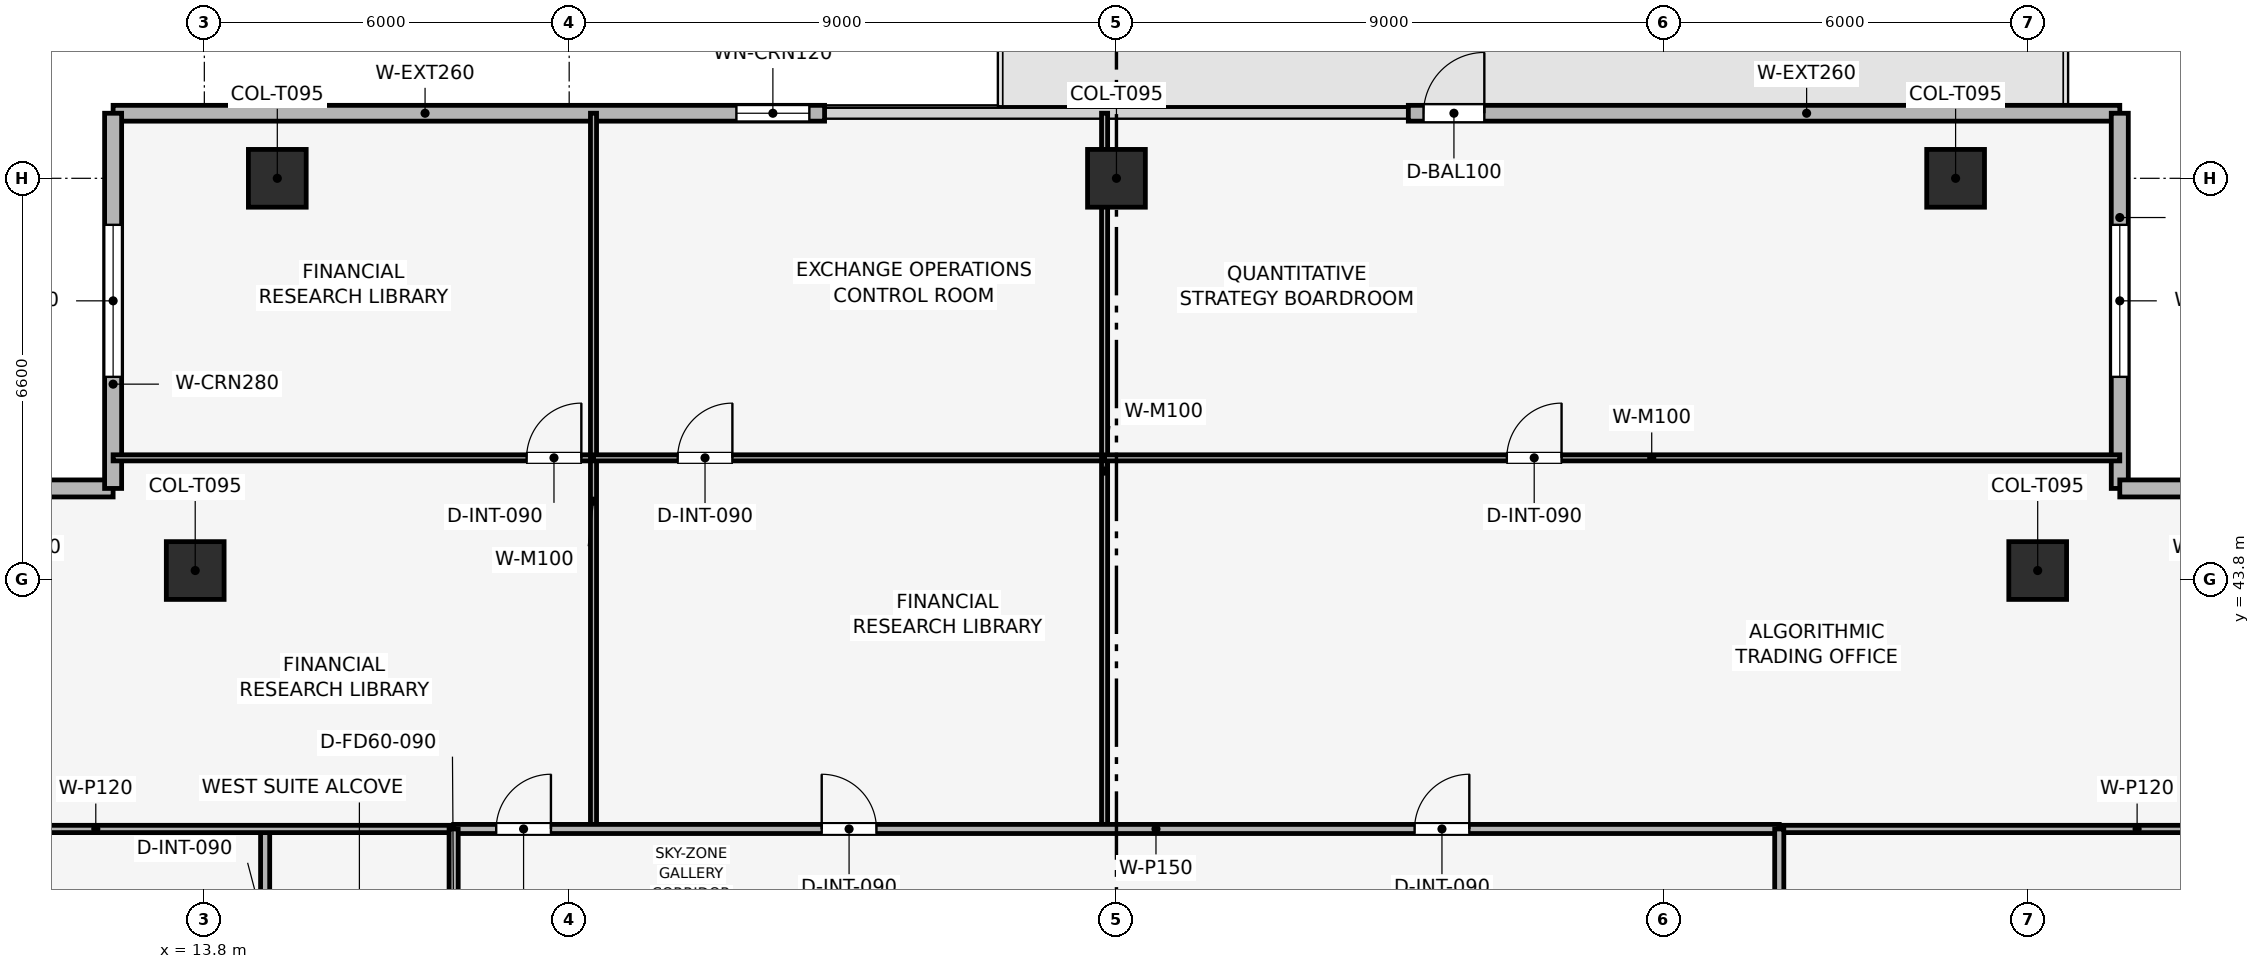
"""IFC4 building model, lengths in metres.
Left out: names, types, materials, properties, quantities, classifications, styles, units other than length and angle.
Written with IfcOpenShell. Run it as: python <this file> out.ifc"""

import sys

from ifc_helpers import new_model, si_unit, direction, frame, frame_2d, origin, origin_2d, place, context, subcontext, project, spatial, rectangle, extrude, element, fill, save


model = new_model("IFC4")
c1 = context("Model", 3, precision=1e-05, world=origin(), true_north=direction((0.0, 1.0)))
c2 = subcontext(c1, "Body", "Model", "MODEL_VIEW")
j1 = project(units=[si_unit("LENGTHUNIT", "METRE"), si_unit("PLANEANGLEUNIT", "RADIAN")], contexts=[c1])
p1 = place(None, origin())
s1 = spatial("IfcSite", under=j1, at=p1, CompositionType="ELEMENT")
p2 = place(p1, origin())
s2 = spatial("IfcBuilding", under=s1, at=p2, CompositionType="ELEMENT")
p3 = place(p2, frame((0.0, 0.0, 314.25)))
s3 = spatial("IfcBuildingStorey", under=s2, at=p3, CompositionType="ELEMENT", Elevation=314.25)
for number, where, z_axis, x_axis in (
    (1, (42.6, 50.4, 0.003), (0.0, 0.0, 1.0), (1.0, 0.0, 0.0)),
    (2, (28.8, 50.4, 0.003), (0.0, 0.0, 1.0), (1.0, 0.0, 0.0)),
    (3, (15.0, 50.4, 0.003), (0.0, 0.0, 1.0), (1.0, 0.0, 0.0)),
    (4, (43.95, 43.95, 0.003), (0.0, 0.0, 1.0), (1.0, 0.0, 0.0)),
    (5, (13.65, 43.95, 0.003), (0.0, 0.0, 1.0), (1.0, 0.0, 0.0)),
):
    element("IfcColumn", number, at=place(p3, frame(where, z_axis=z_axis, x_axis=x_axis)), inside=s3, PredefinedType="COLUMN", context=c2, shape_type="SweptSolid", body=[
        extrude(rectangle(XDim=0.95, YDim=0.95, at=origin_2d()), origin(), (0.0, 0.0, 1.0), 3.504),
    ])
p4 = place(p3, frame((12.3, 51.47, 0.0), z_axis=(0.0, 0.0, 1.0), x_axis=(1.0, 0.0, 0.0)))
e6 = element("IfcWall", 6, at=p4, inside=s3, PredefinedType="SOLIDWALL", context=c2, shape_type="SweptSolid", body=[
    extrude(rectangle(XDim=11.7, YDim=0.26, at=frame_2d((5.85, 0.0))), origin(), (0.0, 0.0, 1.0), 3.51),
])
p5 = place(p4, frame((10.25, 0.0, 0.9)))
e7 = element("IfcOpeningElement", 7, at=p5, cuts=e6, PredefinedType="OPENING", context=c2, shape_type="SweptSolid", body=[
    extrude(rectangle(XDim=1.2, YDim=2.1, at=frame_2d((0.6, 1.05))), frame((0.0, 0.14, 0.0), z_axis=(0.0, -1.0, 0.0), x_axis=(1.0, 0.0, 0.0)), (0.0, 0.0, 1.0), 0.28),
])
p6 = place(p3, frame((33.6, 51.47, 0.0), z_axis=(0.0, 0.0, 1.0), x_axis=(1.0, 0.0, 0.0)))
e8 = element("IfcWall", 8, at=p6, inside=s3, PredefinedType="SOLIDWALL", context=c2, shape_type="SweptSolid", body=[
    extrude(rectangle(XDim=11.7, YDim=0.26, at=frame_2d((5.85, 0.0))), origin(), (0.0, 0.0, 1.0), 3.51),
])
p7 = place(p6, frame((0.25, 0.0, 0.0)))
e9 = element("IfcOpeningElement", 9, at=p7, cuts=e8, PredefinedType="OPENING", context=c2, shape_type="SweptSolid", body=[
    extrude(rectangle(XDim=1.0, YDim=2.2, at=frame_2d((0.5, 1.1))), frame((0.0, 0.14, 0.0), z_axis=(0.0, -1.0, 0.0), x_axis=(1.0, 0.0, 0.0)), (0.0, 0.0, 1.0), 0.28),
])
p8 = place(p3, frame((6.13, 45.3, 0.0), z_axis=(0.0, 0.0, 1.0), x_axis=(1.0, 0.0, 0.0)))
e10 = element("IfcWall", 10, at=p8, inside=s3, PredefinedType="SOLIDWALL", context=c2, shape_type="SweptSolid", body=[
    extrude(rectangle(XDim=6.17, YDim=0.28, at=frame_2d((3.085, 0.0))), origin(), (0.0, 0.0, 1.0), 3.51),
])
p9 = place(p8, frame((1.835, 0.0, 0.9)))
e11 = element("IfcOpeningElement", 11, at=p9, cuts=e10, PredefinedType="OPENING", context=c2, shape_type="SweptSolid", body=[
    extrude(rectangle(XDim=2.5, YDim=1.9, at=frame_2d((1.25, 0.95))), frame((0.0, 0.15, 0.0), z_axis=(0.0, -1.0, 0.0), x_axis=(1.0, 0.0, 0.0)), (0.0, 0.0, 1.0), 0.3),
])
p10 = place(p3, frame((12.3, 45.3, 0.0), z_axis=(0.0, 0.0, 1.0), x_axis=(0.0, 1.0, 0.0)))
e12 = element("IfcWall", 12, at=p10, inside=s3, PredefinedType="SOLIDWALL", context=c2, shape_type="SweptSolid", body=[
    extrude(rectangle(XDim=6.17, YDim=0.28, at=frame_2d((3.085, 0.0))), origin(), (0.0, 0.0, 1.0), 3.51),
])
p11 = place(p10, frame((1.835, 0.0, 0.9)))
e13 = element("IfcOpeningElement", 13, at=p11, cuts=e12, PredefinedType="OPENING", context=c2, shape_type="SweptSolid", body=[
    extrude(rectangle(XDim=2.5, YDim=1.9, at=frame_2d((1.25, 0.95))), frame((0.0, 0.15, 0.0), z_axis=(0.0, -1.0, 0.0), x_axis=(1.0, 0.0, 0.0)), (0.0, 0.0, 1.0), 0.3),
])
p12 = place(p3, frame((45.3, 51.47, 0.0), z_axis=(0.0, 0.0, 1.0), x_axis=(0.0, -1.0, 0.0)))
e14 = element("IfcWall", 14, at=p12, inside=s3, PredefinedType="SOLIDWALL", context=c2, shape_type="SweptSolid", body=[
    extrude(rectangle(XDim=6.17, YDim=0.28, at=frame_2d((3.085, 0.0))), origin(), (0.0, 0.0, 1.0), 3.51),
])
p13 = place(p12, frame((1.835, 0.0, 0.9)))
e15 = element("IfcOpeningElement", 15, at=p13, cuts=e14, PredefinedType="OPENING", context=c2, shape_type="SweptSolid", body=[
    extrude(rectangle(XDim=2.5, YDim=1.9, at=frame_2d((1.25, 0.95))), frame((0.0, 0.15, 0.0), z_axis=(0.0, -1.0, 0.0), x_axis=(1.0, 0.0, 0.0)), (0.0, 0.0, 1.0), 0.3),
])
p14 = place(p3, frame((45.3, 45.3, 0.0), z_axis=(0.0, 0.0, 1.0), x_axis=(1.0, 0.0, 0.0)))
e16 = element("IfcWall", 16, at=p14, inside=s3, PredefinedType="SOLIDWALL", context=c2, shape_type="SweptSolid", body=[
    extrude(rectangle(XDim=6.17, YDim=0.28, at=frame_2d((3.085, 0.0))), origin(), (0.0, 0.0, 1.0), 3.51),
])
p15 = place(p14, frame((1.835, 0.0, 0.9)))
e17 = element("IfcOpeningElement", 17, at=p15, cuts=e16, PredefinedType="OPENING", context=c2, shape_type="SweptSolid", body=[
    extrude(rectangle(XDim=2.5, YDim=1.9, at=frame_2d((1.25, 0.95))), frame((0.0, 0.15, 0.0), z_axis=(0.0, -1.0, 0.0), x_axis=(1.0, 0.0, 0.0)), (0.0, 0.0, 1.0), 0.3),
])
p16 = place(p3, frame((12.3, 45.803, 0.0), z_axis=(0.0, 0.0, 1.0), x_axis=(1.0, 0.0, 0.0)))
e18 = element("IfcWall", 18, at=p16, inside=s3, PredefinedType="MOVABLE", context=c2, shape_type="SweptSolid", body=[
    extrude(rectangle(XDim=7.9, YDim=0.1, at=frame_2d((3.95, 0.0))), origin(), (0.0, 0.0, 1.0), 3.095),
])
p17 = place(p16, frame((6.8, 0.0, 0.0)))
e19 = element("IfcOpeningElement", 19, at=p17, cuts=e18, PredefinedType="OPENING", context=c2, shape_type="SweptSolid", body=[
    extrude(rectangle(XDim=0.9, YDim=2.1, at=frame_2d((0.45, 1.05))), frame((0.0, 0.06, 0.0), z_axis=(0.0, -1.0, 0.0), x_axis=(1.0, 0.0, 0.0)), (0.0, 0.0, 1.0), 0.12),
])
p18 = place(p3, frame((20.2, 39.7, 0.0), z_axis=(0.0, 0.0, 1.0), x_axis=(0.0, 1.0, 0.0)))
e20 = element("IfcWall", 20, at=p18, inside=s3, PredefinedType="MOVABLE", context=c2, shape_type="SweptSolid", body=[
    extrude(rectangle(XDim=11.77, YDim=0.1, at=frame_2d((5.885, 0.0))), origin(), (0.0, 0.0, 1.0), 3.095),
])
p19 = place(p3, frame((20.2, 45.803, 0.0), z_axis=(0.0, 0.0, 1.0), x_axis=(1.0, 0.0, 0.0)))
e21 = element("IfcWall", 21, at=p19, inside=s3, PredefinedType="MOVABLE", context=c2, shape_type="SweptSolid", body=[
    extrude(rectangle(XDim=8.405, YDim=0.1, at=frame_2d((4.203, 0.0))), origin(), (0.0, 0.0, 1.0), 3.095),
])
p20 = place(p19, frame((1.384, 0.0, 0.0)))
e22 = element("IfcOpeningElement", 22, at=p20, cuts=e21, PredefinedType="OPENING", context=c2, shape_type="SweptSolid", body=[
    extrude(rectangle(XDim=0.9, YDim=2.1, at=frame_2d((0.45, 1.05))), frame((0.0, 0.06, 0.0), z_axis=(0.0, -1.0, 0.0), x_axis=(1.0, 0.0, 0.0)), (0.0, 0.0, 1.0), 0.12),
])
p21 = place(p3, frame((28.605, 39.7, 0.0), z_axis=(0.0, 0.0, 1.0), x_axis=(0.0, 1.0, 0.0)))
e23 = element("IfcWall", 23, at=p21, inside=s3, PredefinedType="MOVABLE", context=c2, shape_type="SweptSolid", body=[
    extrude(rectangle(XDim=11.77, YDim=0.1, at=frame_2d((5.885, 0.0))), origin(), (0.0, 0.0, 1.0), 2.995),
])
p22 = place(p3, frame((28.605, 45.803, 0.0), z_axis=(0.0, 0.0, 1.0), x_axis=(1.0, 0.0, 0.0)))
e24 = element("IfcWall", 24, at=p22, inside=s3, PredefinedType="MOVABLE", context=c2, shape_type="SweptSolid", body=[
    extrude(rectangle(XDim=16.695, YDim=0.1, at=frame_2d((8.348, 0.0))), origin(), (0.0, 0.0, 1.0), 3.095),
])
p23 = place(p22, frame((6.615, 0.0, 0.0)))
e25 = element("IfcOpeningElement", 25, at=p23, cuts=e24, PredefinedType="OPENING", context=c2, shape_type="SweptSolid", body=[
    extrude(rectangle(XDim=0.9, YDim=2.1, at=frame_2d((0.45, 1.05))), frame((0.0, 0.06, 0.0), z_axis=(0.0, -1.0, 0.0), x_axis=(1.0, 0.0, 0.0)), (0.0, 0.0, 1.0), 0.12),
])
p24 = place(p3, frame((14.8, 28.0, 0.0), z_axis=(0.0, 0.0, 1.0), x_axis=(0.0, 1.0, 0.0)))
e26 = element("IfcWall", 26, at=p24, inside=s3, PredefinedType="PARTITIONING", context=c2, shape_type="SweptSolid", body=[
    extrude(rectangle(XDim=11.7, YDim=0.15, at=frame_2d((5.85, 0.0))), origin(), (0.0, 0.0, 1.0), 3.095),
])
p25 = place(p24, frame((9.6, 0.0, 0.0)))
e27 = element("IfcOpeningElement", 27, at=p25, cuts=e26, PredefinedType="OPENING", context=c2, shape_type="SweptSolid", body=[
    extrude(rectangle(XDim=0.9, YDim=2.1, at=frame_2d((0.45, 1.05))), frame((0.0, 0.085, 0.0), z_axis=(0.0, -1.0, 0.0), x_axis=(1.0, 0.0, 0.0)), (0.0, 0.0, 1.0), 0.17),
])
for number, where, z_axis, x_axis in (
    (28, (6.13, 39.7, 0.0), (0.0, 0.0, 1.0), (1.0, 0.0, 0.0)),
    (29, (39.7, 39.7, 0.0), (0.0, 0.0, 1.0), (1.0, 0.0, 0.0)),
):
    element("IfcWall", number, at=place(p3, frame(where, z_axis=z_axis, x_axis=x_axis)), inside=s3, PredefinedType="PARTITIONING", context=c2, shape_type="SweptSolid", body=[
        extrude(rectangle(XDim=11.77, YDim=0.12, at=frame_2d((5.885, 0.0))), origin(), (0.0, 0.0, 1.0), 3.095),
    ])
p26 = place(p3, frame((17.9, 39.7, 0.0), z_axis=(0.0, 0.0, 1.0), x_axis=(1.0, 0.0, 0.0)))
e30 = element("IfcWall", 30, at=p26, inside=s3, PredefinedType="PARTITIONING", context=c2, shape_type="SweptSolid", body=[
    extrude(rectangle(XDim=21.8, YDim=0.15, at=frame_2d((10.9, 0.0))), origin(), (0.0, 0.0, 1.0), 3.095),
])
p27 = place(p26, frame((0.7, 0.0, 0.0)))
e31 = element("IfcOpeningElement", 31, at=p27, cuts=e30, PredefinedType="OPENING", context=c2, shape_type="SweptSolid", body=[
    extrude(rectangle(XDim=0.9, YDim=2.1, at=frame_2d((0.45, 1.05))), frame((0.0, 0.085, 0.0), z_axis=(0.0, -1.0, 0.0), x_axis=(1.0, 0.0, 0.0)), (0.0, 0.0, 1.0), 0.17),
])
p28 = place(p26, frame((6.053, 0.0, 0.0)))
e32 = element("IfcOpeningElement", 32, at=p28, cuts=e30, PredefinedType="OPENING", context=c2, shape_type="SweptSolid", body=[
    extrude(rectangle(XDim=0.9, YDim=2.1, at=frame_2d((0.45, 1.05))), frame((0.0, 0.085, 0.0), z_axis=(0.0, -1.0, 0.0), x_axis=(1.0, 0.0, 0.0)), (0.0, 0.0, 1.0), 0.17),
])
p29 = place(p26, frame((15.803, 0.0, 0.0)))
e33 = element("IfcOpeningElement", 33, at=p29, cuts=e30, PredefinedType="OPENING", context=c2, shape_type="SweptSolid", body=[
    extrude(rectangle(XDim=0.9, YDim=2.1, at=frame_2d((0.45, 1.05))), frame((0.0, 0.085, 0.0), z_axis=(0.0, -1.0, 0.0), x_axis=(1.0, 0.0, 0.0)), (0.0, 0.0, 1.0), 0.17),
])
p30 = place(p3, frame((17.9, 12.3, 0.0), z_axis=(0.0, 0.0, 1.0), x_axis=(0.0, 1.0, 0.0)))
e34 = element("IfcWall", 34, at=p30, inside=s3, PredefinedType="PARTITIONING", context=c2, shape_type="SweptSolid", body=[
    extrude(rectangle(XDim=27.4, YDim=0.15, at=frame_2d((13.7, 0.0))), origin(), (0.0, 0.0, 1.0), 3.095),
])
p31 = place(p30, frame((2.365, 0.0, 0.0)))
e35 = element("IfcOpeningElement", 35, at=p31, cuts=e34, PredefinedType="OPENING", context=c2, shape_type="SweptSolid", body=[
    extrude(rectangle(XDim=0.9, YDim=2.1, at=frame_2d((0.45, 1.05))), frame((0.0, 0.085, 0.0), z_axis=(0.0, -1.0, 0.0), x_axis=(1.0, 0.0, 0.0)), (0.0, 0.0, 1.0), 0.17),
])
p32 = place(p30, frame((10.215, 0.0, 0.0)))
e36 = element("IfcOpeningElement", 36, at=p32, cuts=e34, PredefinedType="OPENING", context=c2, shape_type="SweptSolid", body=[
    extrude(rectangle(XDim=0.9, YDim=2.1, at=frame_2d((0.45, 1.05))), frame((0.0, 0.085, 0.0), z_axis=(0.0, -1.0, 0.0), x_axis=(1.0, 0.0, 0.0)), (0.0, 0.0, 1.0), 0.17),
])
p33 = place(p30, frame((16.65, 0.0, 0.0)))
e37 = element("IfcOpeningElement", 37, at=p33, cuts=e34, PredefinedType="OPENING", context=c2, shape_type="SweptSolid", body=[
    extrude(rectangle(XDim=0.9, YDim=2.1, at=frame_2d((0.45, 1.05))), frame((0.0, 0.085, 0.0), z_axis=(0.0, -1.0, 0.0), x_axis=(1.0, 0.0, 0.0)), (0.0, 0.0, 1.0), 0.17),
])
p34 = place(p30, frame((19.55, 0.0, 0.0)))
e38 = element("IfcOpeningElement", 38, at=p34, cuts=e34, PredefinedType="OPENING", context=c2, shape_type="SweptSolid", body=[
    extrude(rectangle(XDim=0.9, YDim=2.1, at=frame_2d((0.45, 1.05))), frame((0.0, 0.085, 0.0), z_axis=(0.0, -1.0, 0.0), x_axis=(1.0, 0.0, 0.0)), (0.0, 0.0, 1.0), 0.17),
])
p35 = place(p30, frame((22.3, 0.0, 0.0)))
e39 = element("IfcOpeningElement", 39, at=p35, cuts=e34, PredefinedType="OPENING", context=c2, shape_type="SweptSolid", body=[
    extrude(rectangle(XDim=0.95, YDim=2.1, at=frame_2d((0.475, 1.05))), frame((0.0, 0.085, 0.0), z_axis=(0.0, -1.0, 0.0), x_axis=(1.0, 0.0, 0.0)), (0.0, 0.0, 1.0), 0.17),
])
p36 = place(p30, frame((25.3, 0.0, 0.0)))
e40 = element("IfcOpeningElement", 40, at=p36, cuts=e34, PredefinedType="OPENING", context=c2, shape_type="SweptSolid", body=[
    extrude(rectangle(XDim=0.9, YDim=2.1, at=frame_2d((0.45, 1.05))), frame((0.0, 0.085, 0.0), z_axis=(0.0, -1.0, 0.0), x_axis=(1.0, 0.0, 0.0)), (0.0, 0.0, 1.0), 0.17),
])
p37 = place(p3, frame((39.7, 24.4, 0.0), z_axis=(0.0, 0.0, 1.0), x_axis=(0.0, 1.0, 0.0)))
e41 = element("IfcWall", 41, at=p37, inside=s3, PredefinedType="PARTITIONING", context=c2, shape_type="SweptSolid", body=[
    extrude(rectangle(XDim=15.3, YDim=0.15, at=frame_2d((7.65, 0.0))), origin(), (0.0, 0.0, 1.0), 3.095),
])
p38 = place(p37, frame((7.2, 0.0, 0.0)))
e42 = element("IfcOpeningElement", 42, at=p38, cuts=e41, PredefinedType="OPENING", context=c2, shape_type="SweptSolid", body=[
    extrude(rectangle(XDim=0.9, YDim=2.1, at=frame_2d((0.45, 1.05))), frame((0.0, 0.085, 0.0), z_axis=(0.0, -1.0, 0.0), x_axis=(1.0, 0.0, 0.0)), (0.0, 0.0, 1.0), 0.17),
])
p39 = place(p7, origin())
e43 = element("IfcDoor", 43, at=p39, inside=s3, OperationType="SINGLE_SWING_RIGHT", PredefinedType="DOOR", context=c2, shape_type="SweptSolid", body=[
    extrude(rectangle(XDim=1.0, YDim=2.2, at=frame_2d((0.5, 1.1))), frame((0.0, 0.025, 0.0), z_axis=(0.0, -1.0, 0.0), x_axis=(1.0, 0.0, 0.0)), (0.0, 0.0, 1.0), 0.05),
])
fill(e9, e43)
p40 = place(p5, origin())
e44 = element("IfcWindow", 44, at=p40, inside=s3, PartitioningType="SINGLE_PANEL", PredefinedType="WINDOW", context=c2, shape_type="SweptSolid", body=[
    extrude(rectangle(XDim=1.2, YDim=2.1, at=frame_2d((0.6, 1.05))), frame((0.0, 0.03, 0.0), z_axis=(0.0, -1.0, 0.0), x_axis=(1.0, 0.0, 0.0)), (0.0, 0.0, 1.0), 0.06),
])
fill(e7, e44)
p41 = place(p11, origin())
e45 = element("IfcWindow", 45, at=p41, inside=s3, PartitioningType="SINGLE_PANEL", PredefinedType="WINDOW", context=c2, shape_type="SweptSolid", body=[
    extrude(rectangle(XDim=2.5, YDim=1.9, at=frame_2d((1.25, 0.95))), frame((0.0, 0.03, 0.0), z_axis=(0.0, -1.0, 0.0), x_axis=(1.0, 0.0, 0.0)), (0.0, 0.0, 1.0), 0.06),
])
fill(e13, e45)
p42 = place(p13, origin())
e46 = element("IfcWindow", 46, at=p42, inside=s3, PartitioningType="SINGLE_PANEL", PredefinedType="WINDOW", context=c2, shape_type="SweptSolid", body=[
    extrude(rectangle(XDim=2.5, YDim=1.9, at=frame_2d((1.25, 0.95))), frame((0.0, 0.03, 0.0), z_axis=(0.0, -1.0, 0.0), x_axis=(1.0, 0.0, 0.0)), (0.0, 0.0, 1.0), 0.06),
])
fill(e15, e46)
p43 = place(p17, origin())
e47 = element("IfcDoor", 47, at=p43, inside=s3, OperationType="SINGLE_SWING_RIGHT", PredefinedType="DOOR", context=c2, shape_type="SweptSolid", body=[
    extrude(rectangle(XDim=0.9, YDim=2.1, at=frame_2d((0.45, 1.05))), frame((0.0, 0.025, 0.0), z_axis=(0.0, -1.0, 0.0), x_axis=(1.0, 0.0, 0.0)), (0.0, 0.0, 1.0), 0.05),
])
fill(e19, e47)
p44 = place(p20, origin())
e48 = element("IfcDoor", 48, at=p44, inside=s3, OperationType="SINGLE_SWING_RIGHT", PredefinedType="DOOR", context=c2, shape_type="SweptSolid", body=[
    extrude(rectangle(XDim=0.9, YDim=2.1, at=frame_2d((0.45, 1.05))), frame((0.0, 0.025, 0.0), z_axis=(0.0, -1.0, 0.0), x_axis=(1.0, 0.0, 0.0)), (0.0, 0.0, 1.0), 0.05),
])
fill(e22, e48)
p45 = place(p23, origin())
e49 = element("IfcDoor", 49, at=p45, inside=s3, OperationType="SINGLE_SWING_RIGHT", PredefinedType="DOOR", context=c2, shape_type="SweptSolid", body=[
    extrude(rectangle(XDim=0.9, YDim=2.1, at=frame_2d((0.45, 1.05))), frame((0.0, 0.025, 0.0), z_axis=(0.0, -1.0, 0.0), x_axis=(1.0, 0.0, 0.0)), (0.0, 0.0, 1.0), 0.05),
])
fill(e25, e49)
p46 = place(p27, origin())
e50 = element("IfcDoor", 50, at=p46, inside=s3, OperationType="SINGLE_SWING_RIGHT", PredefinedType="DOOR", context=c2, shape_type="SweptSolid", body=[
    extrude(rectangle(XDim=0.9, YDim=2.1, at=frame_2d((0.45, 1.05))), frame((0.0, 0.025, 0.0), z_axis=(0.0, -1.0, 0.0), x_axis=(1.0, 0.0, 0.0)), (0.0, 0.0, 1.0), 0.05),
])
fill(e31, e50)
p47 = place(p28, origin())
e51 = element("IfcDoor", 51, at=p47, inside=s3, OperationType="SINGLE_SWING_LEFT", PredefinedType="DOOR", context=c2, shape_type="SweptSolid", body=[
    extrude(rectangle(XDim=0.9, YDim=2.1, at=frame_2d((0.45, 1.05))), frame((0.0, 0.025, 0.0), z_axis=(0.0, -1.0, 0.0), x_axis=(1.0, 0.0, 0.0)), (0.0, 0.0, 1.0), 0.05),
])
fill(e32, e51)
p48 = place(p29, origin())
e52 = element("IfcDoor", 52, at=p48, inside=s3, OperationType="SINGLE_SWING_RIGHT", PredefinedType="DOOR", context=c2, shape_type="SweptSolid", body=[
    extrude(rectangle(XDim=0.9, YDim=2.1, at=frame_2d((0.45, 1.05))), frame((0.0, 0.025, 0.0), z_axis=(0.0, -1.0, 0.0), x_axis=(1.0, 0.0, 0.0)), (0.0, 0.0, 1.0), 0.05),
])
fill(e33, e52)
save(model, sys.argv[1])
